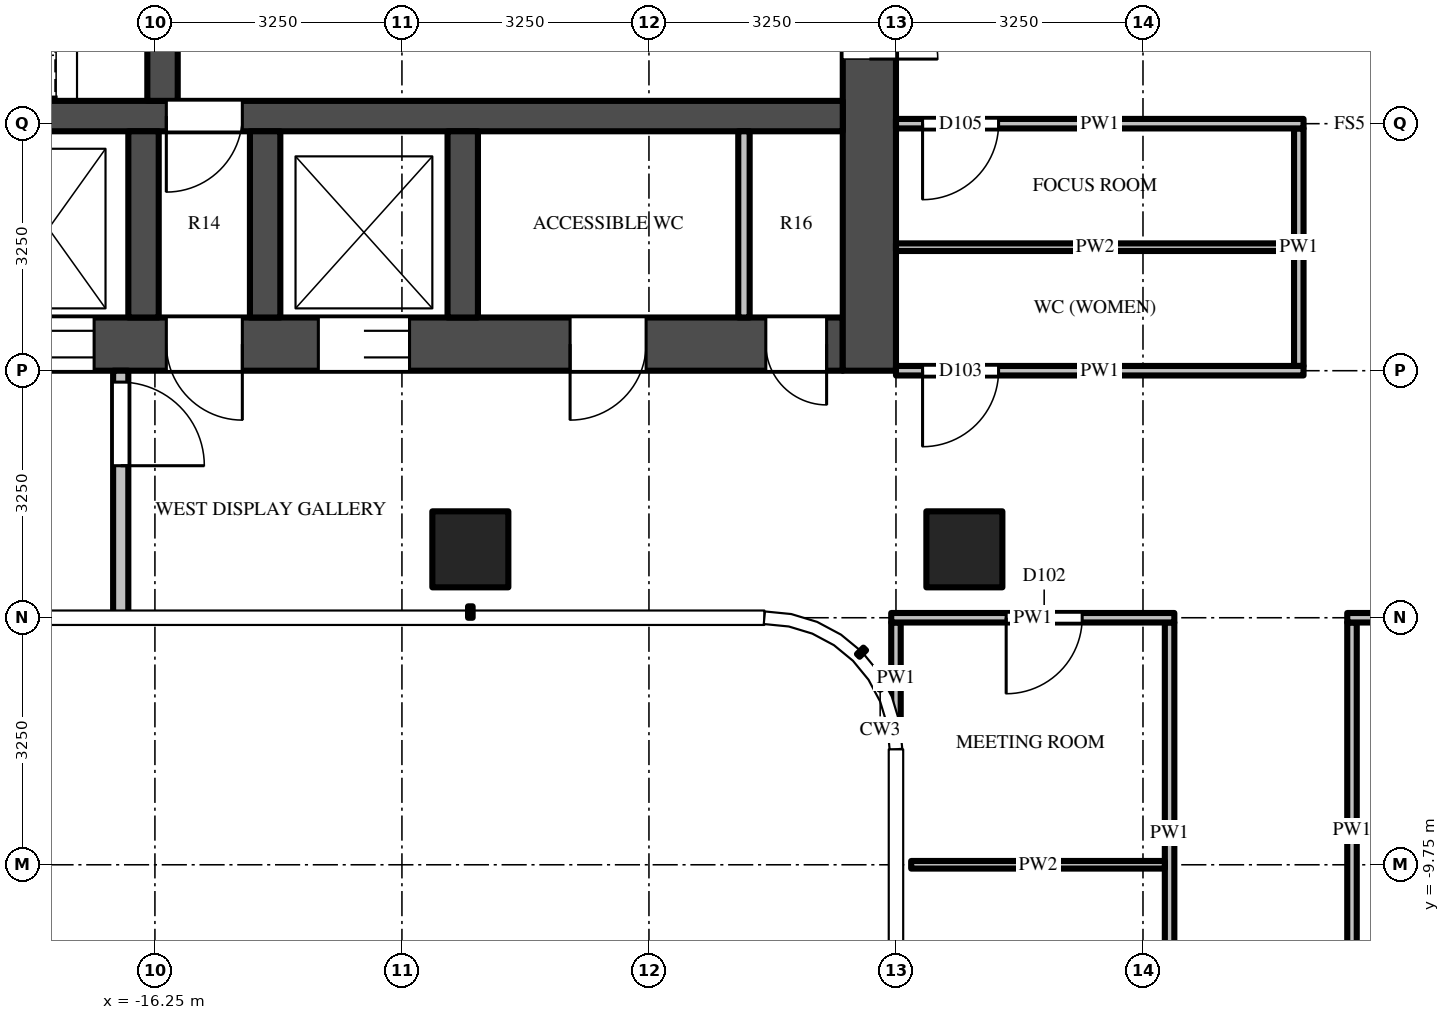
"""IFC4 building model, lengths in metres.
Left out: names, types, materials, properties, quantities, classifications, styles, units other than length and angle.
Written with IfcOpenShell. Run it as: python <this file> out.ifc"""

import sys

from ifc_helpers import new_model, si_unit, direction, frame, frame_2d, origin, origin_2d, place, context, subcontext, project, spatial, rectangle, extrude, source, transform, mapped, element, fill, save


model = new_model("IFC4")
c1 = context("Model", 3, precision=1e-05, world=origin(), true_north=direction((0.0, 1.0)))
c2 = subcontext(c1, "Body", "Model", "MODEL_VIEW")
j1 = project(units=[si_unit("LENGTHUNIT", "METRE"), si_unit("PLANEANGLEUNIT", "RADIAN")], contexts=[c1])
p1 = place(None, origin())
s1 = spatial("IfcSite", under=j1, at=p1, CompositionType="ELEMENT")
p2 = place(p1, origin())
s2 = spatial("IfcBuilding", under=s1, at=p2, CompositionType="ELEMENT")
p3 = place(p2, frame((0.0, 0.0, 287.2)))
s3 = spatial("IfcBuildingStorey", under=s2, at=p3, CompositionType="ELEMENT", Elevation=287.2)
m1 = source(origin(), c2, "Body", "SweptSolid", [
    extrude(rectangle(XDim=1.0, YDim=1.0, at=origin_2d()), origin(), (0.0, 0.0, 1.0), 3.9),
])
for number, where, z_axis, x_axis in (
    (1, (-5.6, -5.6, 0.0), (0.0, 0.0, 1.0), (1.0, 0.0, 0.0)),
    (2, (-12.1, -5.6, 0.0), (0.0, 0.0, 1.0), (1.0, 0.0, 0.0)),
):
    element("IfcColumn", number, at=place(p3, frame(where, z_axis=z_axis, x_axis=x_axis)), inside=s3, PredefinedType="COLUMN", context=c2, shape_type="MappedRepresentation", body=[
        mapped(m1, transform((0.0, 0.0, 0.0))),
    ])
m2 = source(origin(), c2, "Body", "SweptSolid", [
    extrude(rectangle(XDim=14.85, YDim=0.7, at=frame_2d((7.425, 0.0))), origin(), (0.0, 0.0, 1.0), 3.7),
])
p4 = place(p3, frame((-7.2, -2.9, 0.0), z_axis=(0.0, 0.0, 1.0), x_axis=(-1.0, 0.0, 0.0)))
e3 = element("IfcWall", 3, at=p4, inside=s3, PredefinedType="SHEAR", context=c2, shape_type="MappedRepresentation", body=[
    mapped(m2, transform((0.0, 0.0, 0.0))),
])
m3 = source(origin(), c2, "Body", "SweptSolid", [
    extrude(rectangle(XDim=1.2, YDim=2.1, at=frame_2d((0.6, 1.05))), frame((0.0, 0.36, 0.0), z_axis=(0.0, -1.0, 0.0), x_axis=(1.0, 0.0, 0.0)), (0.0, 0.0, 1.0), 0.72),
])
p5 = place(p4, frame((5.7, 0.0, 0.0)))
e4 = element("IfcOpeningElement", 4, at=p5, cuts=e3, PredefinedType="OPENING", context=c2, shape_type="MappedRepresentation", body=[
    mapped(m3, transform((0.0, 0.0, 0.0))),
])
m4 = source(origin(), c2, "Body", "SweptSolid", [
    extrude(rectangle(XDim=1.3, YDim=2.1, at=frame_2d((0.65, 1.05))), frame((0.0, 0.36, 0.0), z_axis=(0.0, -1.0, 0.0), x_axis=(1.0, 0.0, 0.0)), (0.0, 0.0, 1.0), 0.72),
])
p6 = place(p4, frame((12.2, 0.0, 0.0)))
e5 = element("IfcOpeningElement", 5, at=p6, cuts=e3, PredefinedType="OPENING", context=c2, shape_type="MappedRepresentation", body=[
    mapped(m4, transform((0.0, 0.0, 0.0))),
])
p7 = place(p4, frame((9.85, 0.0, 0.0)))
e6 = element("IfcOpeningElement", 6, at=p7, cuts=e3, PredefinedType="OPENING", context=c2, shape_type="MappedRepresentation", body=[
    mapped(m3, transform((0.0, 0.0, 0.0))),
])
m5 = source(origin(), c2, "Body", "SweptSolid", [
    extrude(rectangle(XDim=1.0, YDim=2.1, at=frame_2d((0.5, 1.05))), frame((0.0, 0.36, 0.0), z_axis=(0.0, -1.0, 0.0), x_axis=(1.0, 0.0, 0.0)), (0.0, 0.0, 1.0), 0.72),
])
p8 = place(p4, frame((7.9, 0.0, 0.0)))
e7 = element("IfcOpeningElement", 7, at=p8, cuts=e3, PredefinedType="OPENING", context=c2, shape_type="MappedRepresentation", body=[
    mapped(m5, transform((0.0, 0.0, 0.0))),
])
m6 = source(origin(), c2, "Body", "SweptSolid", [
    extrude(rectangle(XDim=0.8, YDim=2.1, at=frame_2d((0.4, 1.05))), frame((0.0, 0.36, 0.0), z_axis=(0.0, -1.0, 0.0), x_axis=(1.0, 0.0, 0.0)), (0.0, 0.0, 1.0), 0.72),
])
p9 = place(p4, frame((0.212, 0.0, 0.0)))
e8 = element("IfcOpeningElement", 8, at=p9, cuts=e3, PredefinedType="OPENING", context=c2, shape_type="MappedRepresentation", body=[
    mapped(m6, transform((0.0, 0.0, 0.0))),
])
p10 = place(p4, frame((2.587, 0.0, 0.0)))
e9 = element("IfcOpeningElement", 9, at=p10, cuts=e3, PredefinedType="OPENING", context=c2, shape_type="MappedRepresentation", body=[
    mapped(m5, transform((0.0, 0.0, 0.0))),
])
m7 = source(origin(), c2, "Body", "SweptSolid", [
    extrude(rectangle(XDim=9.05, YDim=0.7, at=frame_2d((4.525, 0.0))), origin(), (0.0, 0.0, 1.0), 3.7),
])
p11 = place(p3, frame((-6.85, 5.8, 0.0), z_axis=(0.0, 0.0, 1.0), x_axis=(0.0, -1.0, 0.0)))
e10 = element("IfcWall", 10, at=p11, inside=s3, PredefinedType="SHEAR", context=c2, shape_type="MappedRepresentation", body=[
    mapped(m7, transform((0.0, 0.0, 0.0))),
])
m8 = source(origin(), c2, "Body", "SweptSolid", [
    extrude(rectangle(XDim=1.8, YDim=2.1, at=frame_2d((0.9, 1.05))), frame((0.0, 0.36, 0.0), z_axis=(0.0, -1.0, 0.0), x_axis=(1.0, 0.0, 0.0)), (0.0, 0.0, 1.0), 0.72),
])
p12 = place(p11, frame((3.15, 0.0, 0.0)))
e11 = element("IfcOpeningElement", 11, at=p12, cuts=e10, PredefinedType="OPENING", context=c2, shape_type="MappedRepresentation", body=[
    mapped(m8, transform((0.0, 0.0, 0.0))),
])
m9 = source(origin(), c2, "Body", "SweptSolid", [
    extrude(rectangle(XDim=14.85, YDim=0.4, at=frame_2d((7.425, 0.0))), origin(), (0.0, 0.0, 1.0), 3.7),
])
p13 = place(p3, frame((-7.2, 0.1, 0.0), z_axis=(0.0, 0.0, 1.0), x_axis=(-1.0, 0.0, 0.0)))
e12 = element("IfcWall", 12, at=p13, inside=s3, PredefinedType="SHEAR", context=c2, shape_type="MappedRepresentation", body=[
    mapped(m9, transform((0.0, 0.0, 0.0))),
])
m10 = source(origin(), c2, "Body", "SweptSolid", [
    extrude(rectangle(XDim=1.0, YDim=2.1, at=frame_2d((0.5, 1.05))), frame((0.0, 0.21, 0.0), z_axis=(0.0, -1.0, 0.0), x_axis=(1.0, 0.0, 0.0)), (0.0, 0.0, 1.0), 0.42),
])
p14 = place(p13, frame((7.9, 0.0, 0.0)))
e13 = element("IfcOpeningElement", 13, at=p14, cuts=e12, PredefinedType="OPENING", context=c2, shape_type="MappedRepresentation", body=[
    mapped(m10, transform((0.0, 0.0, 0.0))),
])
m11 = source(origin(), c2, "Body", "SweptSolid", [
    extrude(rectangle(XDim=5.5, YDim=0.4, at=frame_2d((2.75, 0.0))), origin(), (0.0, 0.0, 1.0), 3.7),
])
p15 = place(p3, frame((-16.15, 5.8, 0.0), z_axis=(0.0, 0.0, 1.0), x_axis=(0.0, -1.0, 0.0)))
e14 = element("IfcWall", 14, at=p15, inside=s3, PredefinedType="SHEAR", context=c2, shape_type="MappedRepresentation", body=[
    mapped(m11, transform((0.0, 0.0, 0.0))),
])
m12 = source(origin(), c2, "Body", "SweptSolid", [
    extrude(rectangle(XDim=1.1, YDim=2.1, at=frame_2d((0.55, 1.05))), frame((0.0, 0.21, 0.0), z_axis=(0.0, -1.0, 0.0), x_axis=(1.0, 0.0, 0.0)), (0.0, 0.0, 1.0), 0.42),
])
p16 = place(p15, frame((0.725, 0.0, 0.0)))
e15 = element("IfcOpeningElement", 15, at=p16, cuts=e14, PredefinedType="OPENING", context=c2, shape_type="MappedRepresentation", body=[
    mapped(m12, transform((0.0, 0.0, 0.0))),
])
p17 = place(p15, frame((3.675, 0.0, 0.0)))
e16 = element("IfcOpeningElement", 16, at=p17, cuts=e14, PredefinedType="OPENING", context=c2, shape_type="MappedRepresentation", body=[
    mapped(m12, transform((0.0, 0.0, 0.0))),
])
m13 = source(origin(), c2, "Body", "SweptSolid", [
    extrude(rectangle(XDim=2.45, YDim=0.4, at=frame_2d((1.225, 0.0))), origin(), (0.0, 0.0, 1.0), 3.7),
])
for number, where, z_axis, x_axis in (
    (17, (-12.2, -0.1, 0.0), (0.0, 0.0, 1.0), (0.0, -1.0, 0.0)),
    (18, (-14.8, -0.1, 0.0), (0.0, 0.0, 1.0), (0.0, -1.0, 0.0)),
    (19, (-16.4, -0.1, 0.0), (0.0, 0.0, 1.0), (0.0, -1.0, 0.0)),
):
    element("IfcWall", number, at=place(p3, frame(where, z_axis=z_axis, x_axis=x_axis)), inside=s3, PredefinedType="SHEAR", context=c2, shape_type="MappedRepresentation", body=[
        mapped(m13, transform((0.0, 0.0, 0.0))),
    ])
m14 = source(origin(), c2, "Body", "SweptSolid", [
    extrude(rectangle(XDim=3.25, YDim=0.2, at=frame_2d((1.625, 0.0))), origin(), (0.0, 0.0, 1.0), 3.7),
])
p18 = place(p3, frame((-16.7, -3.25, 0.0), z_axis=(0.0, 0.0, 1.0), x_axis=(0.0, -1.0, 0.0)))
e20 = element("IfcWall", 20, at=p18, inside=s3, PredefinedType="PARTITIONING", context=c2, shape_type="MappedRepresentation", body=[
    mapped(m14, transform((0.0, 0.0, 0.0))),
])
m15 = source(origin(), c2, "Body", "SweptSolid", [
    extrude(rectangle(XDim=1.1, YDim=2.1, at=frame_2d((0.55, 1.05))), frame((0.0, 0.11, 0.0), z_axis=(0.0, -1.0, 0.0), x_axis=(1.0, 0.0, 0.0)), (0.0, 0.0, 1.0), 0.22),
])
p19 = place(p18, frame((0.15, 0.0, 0.0)))
e21 = element("IfcOpeningElement", 21, at=p19, cuts=e20, PredefinedType="OPENING", context=c2, shape_type="MappedRepresentation", body=[
    mapped(m15, transform((0.0, 0.0, 0.0))),
])
m16 = source(origin(), c2, "Body", "SweptSolid", [
    extrude(rectangle(XDim=2.45, YDim=0.15, at=frame_2d((1.225, 0.0))), origin(), (0.0, 0.0, 1.0), 3.7),
])
p20 = place(p3, frame((-8.5, -0.1, 0.0), z_axis=(0.0, 0.0, 1.0), x_axis=(0.0, -1.0, 0.0)))
e22 = element("IfcWall", 22, at=p20, inside=s3, PredefinedType="PARTITIONING", context=c2, shape_type="MappedRepresentation", body=[
    mapped(m16, transform((0.0, 0.0, 0.0))),
])
m17 = source(origin(), c2, "Body", "SweptSolid", [
    extrude(rectangle(XDim=1.469, YDim=0.125, at=frame_2d((0.734, 0.0))), origin(), (0.0, 0.0, 1.0), 3.7),
])
p21 = place(p3, frame((-6.5, -6.562, 0.0), z_axis=(0.0, 0.0, 1.0), x_axis=(0.0, -1.0, 0.0)))
e23 = element("IfcWall", 23, at=p21, inside=s3, PredefinedType="PARTITIONING", context=c2, shape_type="MappedRepresentation", body=[
    mapped(m17, transform((0.0, 0.0, 0.0))),
])
m18 = source(origin(), c2, "Body", "SweptSolid", [
    extrude(rectangle(XDim=5.538, YDim=0.125, at=frame_2d((2.769, 0.0))), origin(), (0.0, 0.0, 1.0), 2.997),
])
p22 = place(p3, frame((-2.9, -12.1, 0.0), z_axis=(0.0, 0.0, 1.0), x_axis=(0.0, 1.0, 0.0)))
e24 = element("IfcWall", 24, at=p22, inside=s3, PredefinedType="PARTITIONING", context=c2, shape_type="MappedRepresentation", body=[
    mapped(m18, transform((0.0, 0.0, 0.0))),
])
m19 = source(origin(), c2, "Body", "SweptSolid", [
    extrude(rectangle(XDim=3.125, YDim=0.125, at=frame_2d((1.562, 0.0))), origin(), (0.0, 0.0, 1.0), 3.068),
])
p23 = place(p3, frame((-1.2, -0.062, 0.0), z_axis=(0.0, 0.0, 1.0), x_axis=(0.0, -1.0, 0.0)))
e25 = element("IfcWall", 25, at=p23, inside=s3, PredefinedType="PARTITIONING", context=c2, shape_type="MappedRepresentation", body=[
    mapped(m19, transform((0.0, 0.0, 0.0))),
])
m20 = source(origin(), c2, "Body", "SweptSolid", [
    extrude(rectangle(XDim=5.475, YDim=0.125, at=frame_2d((2.738, 0.0))), origin(), (0.0, 0.0, 1.0), 2.997),
])
p24 = place(p3, frame((-0.5, -6.562, 0.0), z_axis=(0.0, 0.0, 1.0), x_axis=(0.0, -1.0, 0.0)))
e26 = element("IfcWall", 26, at=p24, inside=s3, PredefinedType="PARTITIONING", context=c2, shape_type="MappedRepresentation", body=[
    mapped(m20, transform((0.0, 0.0, 0.0))),
])
m21 = source(origin(), c2, "Body", "SweptSolid", [
    extrude(rectangle(XDim=3.338, YDim=0.1, at=frame_2d((1.669, 0.0))), origin(), (0.0, 0.0, 1.0), 2.78),
])
p25 = place(p3, frame((-6.3, -9.75, 0.0), z_axis=(0.0, 0.0, 1.0), x_axis=(1.0, 0.0, 0.0)))
e27 = element("IfcWall", 27, at=p25, inside=s3, PredefinedType="PARTITIONING", context=c2, shape_type="MappedRepresentation", body=[
    mapped(m21, transform((0.0, 0.0, 0.0))),
])
m22 = source(origin(), c2, "Body", "SweptSolid", [
    extrude(rectangle(XDim=3.725, YDim=0.125, at=frame_2d((1.863, 0.0))), origin(), (0.0, 0.0, 1.0), 2.78),
])
p26 = place(p3, frame((-2.837, -6.5, 0.0), z_axis=(0.0, 0.0, 1.0), x_axis=(-1.0, 0.0, 0.0)))
e28 = element("IfcWall", 28, at=p26, inside=s3, PredefinedType="PARTITIONING", context=c2, shape_type="MappedRepresentation", body=[
    mapped(m22, transform((0.0, 0.0, 0.0))),
])
m23 = source(origin(), c2, "Body", "SweptSolid", [
    extrude(rectangle(XDim=1.0, YDim=2.1, at=frame_2d((0.5, 1.05))), frame((0.0, 0.073, 0.0), z_axis=(0.0, -1.0, 0.0), x_axis=(1.0, 0.0, 0.0)), (0.0, 0.0, 1.0), 0.145),
])
p27 = place(p26, frame((1.212, 0.0, 0.0)))
e29 = element("IfcOpeningElement", 29, at=p27, cuts=e28, PredefinedType="OPENING", context=c2, shape_type="MappedRepresentation", body=[
    mapped(m23, transform((0.0, 0.0, 0.0))),
])
m24 = source(origin(), c2, "Body", "SweptSolid", [
    extrude(rectangle(XDim=1.825, YDim=0.125, at=frame_2d((0.913, 0.0))), origin(), (0.0, 0.0, 1.0), 3.7),
])
p28 = place(p3, frame((1.262, -6.5, 0.0), z_axis=(0.0, 0.0, 1.0), x_axis=(-1.0, 0.0, 0.0)))
e30 = element("IfcWall", 30, at=p28, inside=s3, PredefinedType="PARTITIONING", context=c2, shape_type="MappedRepresentation", body=[
    mapped(m24, transform((0.0, 0.0, 0.0))),
])
m25 = source(origin(), c2, "Body", "SweptSolid", [
    extrude(rectangle(XDim=5.363, YDim=0.125, at=frame_2d((2.681, 0.0))), origin(), (0.0, 0.0, 1.0), 2.997),
])
p29 = place(p3, frame((-1.137, -3.25, 0.0), z_axis=(0.0, 0.0, 1.0), x_axis=(-1.0, 0.0, 0.0)))
e31 = element("IfcWall", 31, at=p29, inside=s3, PredefinedType="PARTITIONING", context=c2, shape_type="MappedRepresentation", body=[
    mapped(m25, transform((0.0, 0.0, 0.0))),
])
p30 = place(p29, frame((4.012, 0.0, 0.0)))
e32 = element("IfcOpeningElement", 32, at=p30, cuts=e31, PredefinedType="OPENING", context=c2, shape_type="MappedRepresentation", body=[
    mapped(m23, transform((0.0, 0.0, 0.0))),
])
m26 = source(origin(), c2, "Body", "SweptSolid", [
    extrude(rectangle(XDim=5.238, YDim=0.1, at=frame_2d((2.619, 0.0))), origin(), (0.0, 0.0, 1.0), 2.997),
])
p31 = place(p3, frame((-6.5, -1.625, 0.0), z_axis=(0.0, 0.0, 1.0), x_axis=(1.0, 0.0, 0.0)))
e33 = element("IfcWall", 33, at=p31, inside=s3, PredefinedType="PARTITIONING", context=c2, shape_type="MappedRepresentation", body=[
    mapped(m26, transform((0.0, 0.0, 0.0))),
])
p32 = place(p3, frame((-1.137, 0.0, 0.0), z_axis=(0.0, 0.0, 1.0), x_axis=(-1.0, 0.0, 0.0)))
e34 = element("IfcWall", 34, at=p32, inside=s3, PredefinedType="PARTITIONING", context=c2, shape_type="MappedRepresentation", body=[
    mapped(m25, transform((0.0, 0.0, 0.0))),
])
p33 = place(p32, frame((4.012, 0.0, 0.0)))
e35 = element("IfcOpeningElement", 35, at=p33, cuts=e34, PredefinedType="OPENING", context=c2, shape_type="MappedRepresentation", body=[
    mapped(m23, transform((0.0, 0.0, 0.0))),
])
m27 = source(origin(), c2, "Body", "SweptSolid", [
    extrude(rectangle(XDim=1.2, YDim=2.1, at=frame_2d((0.6, 1.05))), frame((0.0, -0.275, 0.0), z_axis=(0.0, -1.0, 0.0), x_axis=(1.0, 0.0, 0.0)), (0.0, 0.0, 1.0), 0.05),
])
p34 = place(p5, origin())
e36 = element("IfcDoor", 36, at=p34, inside=s3, OperationType="DOUBLE_DOOR_SLIDING", PredefinedType="DOOR", context=c2, shape_type="MappedRepresentation", body=[
    mapped(m27, transform((0.0, 0.0, 0.0))),
])
fill(e4, e36)
p35 = place(p7, origin())
e37 = element("IfcDoor", 37, at=p35, inside=s3, OperationType="DOUBLE_DOOR_SLIDING", PredefinedType="DOOR", context=c2, shape_type="MappedRepresentation", body=[
    mapped(m27, transform((0.0, 0.0, 0.0))),
])
fill(e6, e37)
m28 = source(origin(), c2, "Body", "SweptSolid", [
    extrude(rectangle(XDim=1.8, YDim=2.1, at=frame_2d((0.9, 1.05))), frame((0.0, -0.275, 0.0), z_axis=(0.0, -1.0, 0.0), x_axis=(1.0, 0.0, 0.0)), (0.0, 0.0, 1.0), 0.05),
])
p36 = place(p12, origin())
e38 = element("IfcDoor", 38, at=p36, inside=s3, OperationType="DOUBLE_DOOR_SINGLE_SWING", PredefinedType="DOOR", context=c2, shape_type="MappedRepresentation", body=[
    mapped(m28, transform((0.0, 0.0, 0.0))),
])
fill(e11, e38)
m29 = source(origin(), c2, "Body", "SweptSolid", [
    extrude(rectangle(XDim=1.0, YDim=2.1, at=frame_2d((0.5, 1.05))), frame((0.0, 0.025, 0.0), z_axis=(0.0, -1.0, 0.0), x_axis=(1.0, 0.0, 0.0)), (0.0, 0.0, 1.0), 0.05),
])
p37 = place(p14, origin())
e39 = element("IfcDoor", 39, at=p37, inside=s3, OperationType="SINGLE_SWING_RIGHT", PredefinedType="DOOR", context=c2, shape_type="MappedRepresentation", body=[
    mapped(m29, transform((0.0, 0.0, 0.0))),
])
fill(e13, e39)
m30 = source(origin(), c2, "Body", "SweptSolid", [
    extrude(rectangle(XDim=1.0, YDim=2.1, at=frame_2d((0.5, 1.05))), frame((0.0, -0.275, 0.0), z_axis=(0.0, -1.0, 0.0), x_axis=(1.0, 0.0, 0.0)), (0.0, 0.0, 1.0), 0.05),
])
p38 = place(p8, origin())
e40 = element("IfcDoor", 40, at=p38, inside=s3, OperationType="SINGLE_SWING_LEFT", PredefinedType="DOOR", context=c2, shape_type="MappedRepresentation", body=[
    mapped(m30, transform((0.0, 0.0, 0.0))),
])
fill(e7, e40)
m31 = source(origin(), c2, "Body", "SweptSolid", [
    extrude(rectangle(XDim=1.1, YDim=2.1, at=frame_2d((0.55, 1.05))), frame((0.0, 0.025, 0.0), z_axis=(0.0, -1.0, 0.0), x_axis=(1.0, 0.0, 0.0)), (0.0, 0.0, 1.0), 0.05),
])
p39 = place(p19, origin())
e41 = element("IfcDoor", 41, at=p39, inside=s3, OperationType="SINGLE_SWING_RIGHT", PredefinedType="DOOR", context=c2, shape_type="MappedRepresentation", body=[
    mapped(m31, transform((0.0, 0.0, 0.0))),
])
fill(e21, e41)
m32 = source(origin(), c2, "Body", "SweptSolid", [
    extrude(rectangle(XDim=0.8, YDim=2.1, at=frame_2d((0.4, 1.05))), frame((0.0, -0.275, 0.0), z_axis=(0.0, -1.0, 0.0), x_axis=(1.0, 0.0, 0.0)), (0.0, 0.0, 1.0), 0.05),
])
p40 = place(p9, origin())
e42 = element("IfcDoor", 42, at=p40, inside=s3, OperationType="SINGLE_SWING_LEFT", PredefinedType="DOOR", context=c2, shape_type="MappedRepresentation", body=[
    mapped(m32, transform((0.0, 0.0, 0.0))),
])
fill(e8, e42)
p41 = place(p10, origin())
e43 = element("IfcDoor", 43, at=p41, inside=s3, OperationType="SINGLE_SWING_RIGHT", PredefinedType="DOOR", context=c2, shape_type="MappedRepresentation", body=[
    mapped(m30, transform((0.0, 0.0, 0.0))),
])
fill(e9, e43)
p42 = place(p27, origin())
e44 = element("IfcDoor", 44, at=p42, inside=s3, OperationType="SINGLE_SWING_RIGHT", PredefinedType="DOOR", context=c2, shape_type="MappedRepresentation", body=[
    mapped(m29, transform((0.0, 0.0, 0.0))),
])
fill(e29, e44)
p43 = place(p30, origin())
e45 = element("IfcDoor", 45, at=p43, inside=s3, OperationType="SINGLE_SWING_RIGHT", PredefinedType="DOOR", context=c2, shape_type="MappedRepresentation", body=[
    mapped(m29, transform((0.0, 0.0, 0.0))),
])
fill(e32, e45)
p44 = place(p33, origin())
e46 = element("IfcDoor", 46, at=p44, inside=s3, OperationType="SINGLE_SWING_RIGHT", PredefinedType="DOOR", context=c2, shape_type="MappedRepresentation", body=[
    mapped(m29, transform((0.0, 0.0, 0.0))),
])
fill(e35, e46)
save(model, sys.argv[1])
